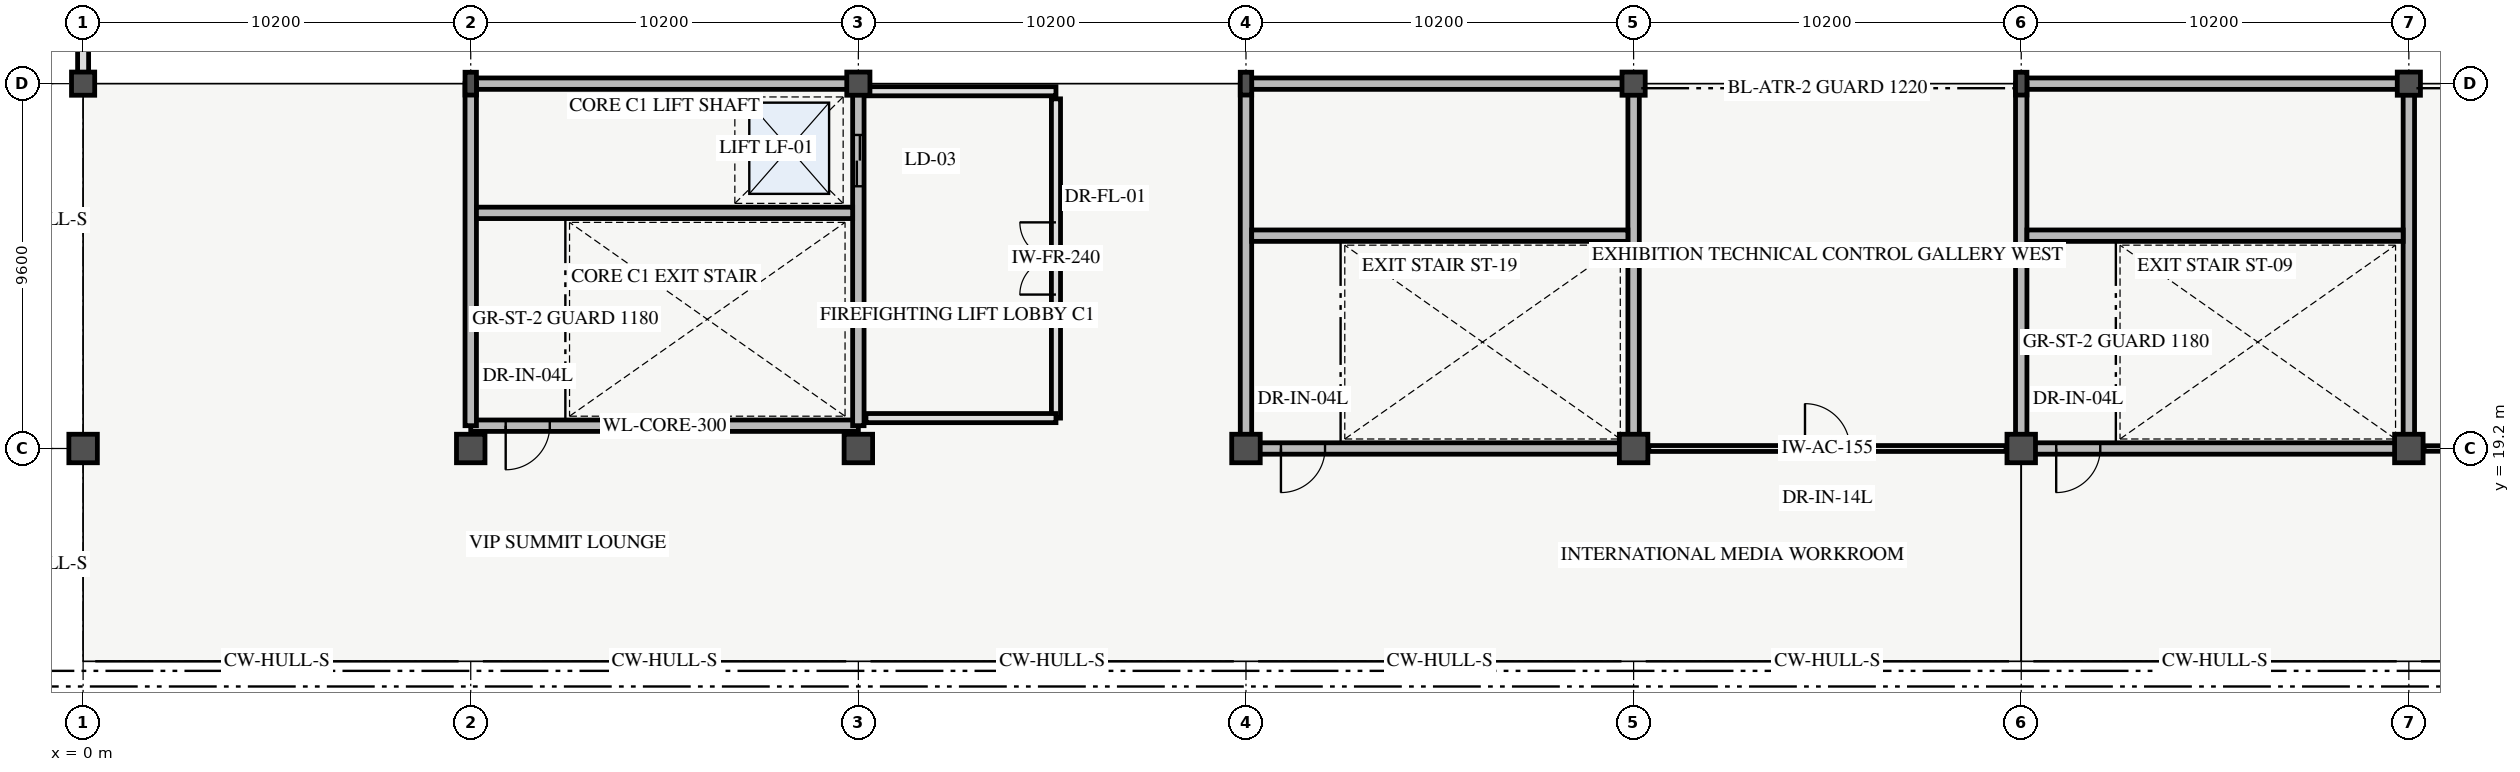
"""IFC4 building model, lengths in metres.
Left out: names, types, materials, properties, quantities, classifications, styles, units other than length and angle.
Written with IfcOpenShell. Run it as: python <this file> out.ifc"""

import sys

from ifc_helpers import new_model, si_unit, direction, frame, frame_2d, origin, origin_2d, place, context, subcontext, project, spatial, rectangle, hollow_circle, i_section, extrude, element, fill, save


model = new_model("IFC4")
c1 = context("Model", 3, precision=1e-05, world=origin(), true_north=direction((0.0, 1.0)))
c2 = subcontext(c1, "Body", "Model", "MODEL_VIEW")
j1 = project(units=[si_unit("LENGTHUNIT", "METRE"), si_unit("PLANEANGLEUNIT", "RADIAN")], contexts=[c1])
p1 = place(None, origin())
s1 = spatial("IfcSite", under=j1, at=p1, CompositionType="ELEMENT")
p2 = place(p1, origin())
s2 = spatial("IfcBuilding", under=s1, at=p2, CompositionType="ELEMENT")
p3 = place(p2, frame((0.0, 0.0, 10.8)))
s3 = spatial("IfcBuildingStorey", under=s2, at=p3, CompositionType="ELEMENT", Elevation=10.8)
p4 = place(p3, frame((0.0, 19.2, 0.0), z_axis=(0.0, 0.0, 1.0), x_axis=(1.0, 0.0, 0.0)))
e1 = element("IfcColumn", 1, at=p4, inside=s3, PredefinedType="COLUMN", context=c2, shape_type="SweptSolid", body=[
    extrude(rectangle(XDim=0.75, YDim=0.75, at=origin_2d()), origin(), (0.0, 0.0, 1.0), 4.2),
])
p5 = place(p3, frame((0.0, 28.8, 0.0), z_axis=(0.0, 0.0, 1.0), x_axis=(1.0, 0.0, 0.0)))
e2 = element("IfcColumn", 2, at=p5, inside=s3, PredefinedType="COLUMN", context=c2, shape_type="SweptSolid", body=[
    extrude(hollow_circle(Radius=0.305, WallThickness=0.025, at=origin_2d()), origin(), (0.0, 0.0, 1.0), 4.2),
])
p6 = place(p3, frame((10.2, 19.2, 0.0), z_axis=(0.0, 0.0, 1.0), x_axis=(1.0, 0.0, 0.0)))
e3 = element("IfcColumn", 3, at=p6, inside=s3, PredefinedType="COLUMN", context=c2, shape_type="SweptSolid", body=[
    extrude(rectangle(XDim=0.75, YDim=0.75, at=origin_2d()), origin(), (0.0, 0.0, 1.0), 4.2),
])
p7 = place(p3, frame((10.2, 28.8, 0.0), z_axis=(0.0, 0.0, 1.0), x_axis=(1.0, 0.0, 0.0)))
e4 = element("IfcColumn", 4, at=p7, inside=s3, PredefinedType="COLUMN", context=c2, shape_type="SweptSolid", body=[
    extrude(i_section(OverallWidth=0.3, OverallDepth=0.6, WebThickness=0.015, FlangeThickness=0.03, FilletRadius=0.027, at=origin_2d()), origin(), (0.0, 0.0, 1.0), 4.2),
])
p8 = place(p3, frame((20.4, 19.2, 0.0), z_axis=(0.0, 0.0, 1.0), x_axis=(1.0, 0.0, 0.0)))
e5 = element("IfcColumn", 5, at=p8, inside=s3, PredefinedType="COLUMN", context=c2, shape_type="SweptSolid", body=[
    extrude(rectangle(XDim=0.75, YDim=0.75, at=origin_2d()), origin(), (0.0, 0.0, 1.0), 4.2),
])
p9 = place(p3, frame((20.4, 28.8, 0.0), z_axis=(0.0, 0.0, 1.0), x_axis=(1.0, 0.0, 0.0)))
e6 = element("IfcColumn", 6, at=p9, inside=s3, PredefinedType="COLUMN", context=c2, shape_type="SweptSolid", body=[
    extrude(hollow_circle(Radius=0.305, WallThickness=0.025, at=origin_2d()), origin(), (0.0, 0.0, 1.0), 4.2),
])
p10 = place(p3, frame((30.6, 19.2, 0.0), z_axis=(0.0, 0.0, 1.0), x_axis=(1.0, 0.0, 0.0)))
e7 = element("IfcColumn", 7, at=p10, inside=s3, PredefinedType="COLUMN", context=c2, shape_type="SweptSolid", body=[
    extrude(rectangle(XDim=0.75, YDim=0.75, at=origin_2d()), origin(), (0.0, 0.0, 1.0), 4.2),
])
p11 = place(p3, frame((30.6, 28.8, 0.0), z_axis=(0.0, 0.0, 1.0), x_axis=(1.0, 0.0, 0.0)))
e8 = element("IfcColumn", 8, at=p11, inside=s3, PredefinedType="COLUMN", context=c2, shape_type="SweptSolid", body=[
    extrude(i_section(OverallWidth=0.3, OverallDepth=0.6, WebThickness=0.015, FlangeThickness=0.03, FilletRadius=0.027, at=origin_2d()), origin(), (0.0, 0.0, 1.0), 4.2),
])
p12 = place(p3, frame((40.8, 19.2, 0.0), z_axis=(0.0, 0.0, 1.0), x_axis=(1.0, 0.0, 0.0)))
e9 = element("IfcColumn", 9, at=p12, inside=s3, PredefinedType="COLUMN", context=c2, shape_type="SweptSolid", body=[
    extrude(rectangle(XDim=0.75, YDim=0.75, at=origin_2d()), origin(), (0.0, 0.0, 1.0), 4.2),
])
p13 = place(p3, frame((40.8, 28.8, 0.0), z_axis=(0.0, 0.0, 1.0), x_axis=(1.0, 0.0, 0.0)))
e10 = element("IfcColumn", 10, at=p13, inside=s3, PredefinedType="COLUMN", context=c2, shape_type="SweptSolid", body=[
    extrude(hollow_circle(Radius=0.305, WallThickness=0.025, at=origin_2d()), origin(), (0.0, 0.0, 1.0), 4.2),
])
p14 = place(p3, frame((51.0, 19.2, 0.0), z_axis=(0.0, 0.0, 1.0), x_axis=(1.0, 0.0, 0.0)))
e11 = element("IfcColumn", 11, at=p14, inside=s3, PredefinedType="COLUMN", context=c2, shape_type="SweptSolid", body=[
    extrude(rectangle(XDim=0.75, YDim=0.75, at=origin_2d()), origin(), (0.0, 0.0, 1.0), 4.2),
])
p15 = place(p3, frame((51.0, 28.8, 0.0), z_axis=(0.0, 0.0, 1.0), x_axis=(1.0, 0.0, 0.0)))
e12 = element("IfcColumn", 12, at=p15, inside=s3, PredefinedType="COLUMN", context=c2, shape_type="SweptSolid", body=[
    extrude(i_section(OverallWidth=0.3, OverallDepth=0.6, WebThickness=0.015, FlangeThickness=0.03, FilletRadius=0.027, at=origin_2d()), origin(), (0.0, 0.0, 1.0), 4.2),
])
p16 = place(p3, frame((61.2, 19.2, 0.0), z_axis=(0.0, 0.0, 1.0), x_axis=(1.0, 0.0, 0.0)))
e13 = element("IfcColumn", 13, at=p16, inside=s3, PredefinedType="COLUMN", context=c2, shape_type="SweptSolid", body=[
    extrude(rectangle(XDim=0.75, YDim=0.75, at=origin_2d()), origin(), (0.0, 0.0, 1.0), 4.2),
])
p17 = place(p3, frame((61.2, 28.8, 0.0), z_axis=(0.0, 0.0, 1.0), x_axis=(1.0, 0.0, 0.0)))
e14 = element("IfcColumn", 14, at=p17, inside=s3, PredefinedType="COLUMN", context=c2, shape_type="SweptSolid", body=[
    extrude(hollow_circle(Radius=0.305, WallThickness=0.025, at=origin_2d()), origin(), (0.0, 0.0, 1.0), 4.2),
])
p18 = place(p3, frame((10.2, 19.8, 0.0), z_axis=(0.0, 0.0, 1.0), x_axis=(1.0, 0.0, 0.0)))
e15 = element("IfcWall", 15, at=p18, inside=s3, PredefinedType="SHEAR", context=c2, shape_type="SweptSolid", body=[
    extrude(rectangle(XDim=10.2, YDim=0.3, at=frame_2d((5.1, 0.0))), origin(), (0.0, 0.0, 1.0), 4.2),
])
p19 = place(p18, frame((0.92, 0.0, 0.0)))
e16 = element("IfcOpeningElement", 16, at=p19, cuts=e15, PredefinedType="OPENING", context=c2, shape_type="SweptSolid", body=[
    extrude(rectangle(XDim=1.16, YDim=2.2, at=frame_2d((0.58, 1.1))), frame((0.0, 0.16, 0.0), z_axis=(0.0, -1.0, 0.0), x_axis=(1.0, 0.0, 0.0)), (0.0, 0.0, 1.0), 0.32),
])
p20 = place(p3, frame((10.2, 28.8, 0.0), z_axis=(0.0, 0.0, 1.0), x_axis=(1.0, 0.0, 0.0)))
e17 = element("IfcWall", 17, at=p20, inside=s3, PredefinedType="SHEAR", context=c2, shape_type="SweptSolid", body=[
    extrude(rectangle(XDim=10.2, YDim=0.3, at=frame_2d((5.1, 0.0))), origin(), (0.0, 0.0, 1.0), 4.2),
])
p21 = place(p3, frame((10.2, 19.8, 0.0), z_axis=(0.0, 0.0, 1.0), x_axis=(0.0, 1.0, 0.0)))
e18 = element("IfcWall", 18, at=p21, inside=s3, PredefinedType="SHEAR", context=c2, shape_type="SweptSolid", body=[
    extrude(rectangle(XDim=9.0, YDim=0.3, at=frame_2d((4.5, 0.0))), origin(), (0.0, 0.0, 1.0), 4.2),
])
p22 = place(p3, frame((20.4, 19.8, 0.0), z_axis=(0.0, 0.0, 1.0), x_axis=(0.0, 1.0, 0.0)))
e19 = element("IfcWall", 19, at=p22, inside=s3, PredefinedType="SHEAR", context=c2, shape_type="SweptSolid", body=[
    extrude(rectangle(XDim=9.0, YDim=0.3, at=frame_2d((4.5, 0.0))), origin(), (0.0, 0.0, 1.0), 4.2),
])
p23 = place(p22, frame((6.3, 0.0, 0.0)))
e20 = element("IfcOpeningElement", 20, at=p23, cuts=e19, PredefinedType="OPENING", context=c2, shape_type="SweptSolid", body=[
    extrude(rectangle(XDim=1.35, YDim=2.3, at=frame_2d((0.675, 1.15))), frame((0.0, 0.16, 0.0), z_axis=(0.0, -1.0, 0.0), x_axis=(1.0, 0.0, 0.0)), (0.0, 0.0, 1.0), 0.32),
])
p24 = place(p3, frame((0.0, 29.04, 0.0), z_axis=(0.0, 0.0, 1.0), x_axis=(0.0, 1.0, 0.0)))
e21 = element("IfcWall", 21, at=p24, inside=s3, PredefinedType="SOLIDWALL", context=c2, shape_type="SweptSolid", body=[
    extrude(rectangle(XDim=11.32, YDim=0.29, at=frame_2d((5.66, 0.0))), origin(), (0.0, 0.0, 1.0), 3.06),
])
p25 = place(p3, frame((10.35, 25.4, 0.0), z_axis=(0.0, 0.0, 1.0), x_axis=(1.0, 0.0, 0.0)))
e22 = element("IfcWall", 22, at=p25, inside=s3, PredefinedType="SHEAR", context=c2, shape_type="SweptSolid", body=[
    extrude(rectangle(XDim=9.9, YDim=0.3, at=frame_2d((4.95, 0.0))), origin(), (0.0, 0.0, 1.0), 4.2),
])
p26 = place(p3, frame((51.0, 19.2, 0.0), z_axis=(0.0, 0.0, 1.0), x_axis=(1.0, 0.0, 0.0)))
e23 = element("IfcWall", 23, at=p26, inside=s3, PredefinedType="SHEAR", context=c2, shape_type="SweptSolid", body=[
    extrude(rectangle(XDim=10.2, YDim=0.3, at=frame_2d((5.1, 0.0))), origin(), (0.0, 0.0, 1.0), 4.2),
])
p27 = place(p26, frame((0.92, 0.0, 0.0)))
e24 = element("IfcOpeningElement", 24, at=p27, cuts=e23, PredefinedType="OPENING", context=c2, shape_type="SweptSolid", body=[
    extrude(rectangle(XDim=1.16, YDim=2.2, at=frame_2d((0.58, 1.1))), frame((0.0, 0.16, 0.0), z_axis=(0.0, -1.0, 0.0), x_axis=(1.0, 0.0, 0.0)), (0.0, 0.0, 1.0), 0.32),
])
p28 = place(p3, frame((51.0, 28.8, 0.0), z_axis=(0.0, 0.0, 1.0), x_axis=(1.0, 0.0, 0.0)))
e25 = element("IfcWall", 25, at=p28, inside=s3, PredefinedType="SHEAR", context=c2, shape_type="SweptSolid", body=[
    extrude(rectangle(XDim=10.2, YDim=0.3, at=frame_2d((5.1, 0.0))), origin(), (0.0, 0.0, 1.0), 4.2),
])
for number, where, z_axis, x_axis in (
    (26, (51.0, 19.2, 0.0), (0.0, 0.0, 1.0), (0.0, 1.0, 0.0)),
    (27, (61.2, 19.2, 0.0), (0.0, 0.0, 1.0), (0.0, 1.0, 0.0)),
):
    element("IfcWall", number, at=place(p3, frame(where, z_axis=z_axis, x_axis=x_axis)), inside=s3, PredefinedType="SHEAR", context=c2, shape_type="SweptSolid", body=[
        extrude(rectangle(XDim=9.6, YDim=0.3, at=frame_2d((4.8, 0.0))), origin(), (0.0, 0.0, 1.0), 4.2),
    ])
p29 = place(p3, frame((51.15, 24.8, 0.0), z_axis=(0.0, 0.0, 1.0), x_axis=(1.0, 0.0, 0.0)))
e28 = element("IfcWall", 28, at=p29, inside=s3, PredefinedType="SHEAR", context=c2, shape_type="SweptSolid", body=[
    extrude(rectangle(XDim=9.9, YDim=0.3, at=frame_2d((4.95, 0.0))), origin(), (0.0, 0.0, 1.0), 4.2),
])
p30 = place(p3, frame((30.6, 19.2, 0.0), z_axis=(0.0, 0.0, 1.0), x_axis=(1.0, 0.0, 0.0)))
e29 = element("IfcWall", 29, at=p30, inside=s3, PredefinedType="SHEAR", context=c2, shape_type="SweptSolid", body=[
    extrude(rectangle(XDim=10.2, YDim=0.3, at=frame_2d((5.1, 0.0))), origin(), (0.0, 0.0, 1.0), 4.2),
])
p31 = place(p30, frame((0.92, 0.0, 0.0)))
e30 = element("IfcOpeningElement", 30, at=p31, cuts=e29, PredefinedType="OPENING", context=c2, shape_type="SweptSolid", body=[
    extrude(rectangle(XDim=1.16, YDim=2.2, at=frame_2d((0.58, 1.1))), frame((0.0, 0.16, 0.0), z_axis=(0.0, -1.0, 0.0), x_axis=(1.0, 0.0, 0.0)), (0.0, 0.0, 1.0), 0.32),
])
p32 = place(p3, frame((30.6, 28.8, 0.0), z_axis=(0.0, 0.0, 1.0), x_axis=(1.0, 0.0, 0.0)))
e31 = element("IfcWall", 31, at=p32, inside=s3, PredefinedType="SHEAR", context=c2, shape_type="SweptSolid", body=[
    extrude(rectangle(XDim=10.2, YDim=0.3, at=frame_2d((5.1, 0.0))), origin(), (0.0, 0.0, 1.0), 4.2),
])
for number, where, z_axis, x_axis in (
    (32, (30.6, 19.2, 0.0), (0.0, 0.0, 1.0), (0.0, 1.0, 0.0)),
    (33, (40.8, 19.2, 0.0), (0.0, 0.0, 1.0), (0.0, 1.0, 0.0)),
):
    element("IfcWall", number, at=place(p3, frame(where, z_axis=z_axis, x_axis=x_axis)), inside=s3, PredefinedType="SHEAR", context=c2, shape_type="SweptSolid", body=[
        extrude(rectangle(XDim=9.6, YDim=0.3, at=frame_2d((4.8, 0.0))), origin(), (0.0, 0.0, 1.0), 4.2),
    ])
p33 = place(p3, frame((30.75, 24.8, 0.0), z_axis=(0.0, 0.0, 1.0), x_axis=(1.0, 0.0, 0.0)))
e34 = element("IfcWall", 34, at=p33, inside=s3, PredefinedType="SHEAR", context=c2, shape_type="SweptSolid", body=[
    extrude(rectangle(XDim=9.9, YDim=0.3, at=frame_2d((4.95, 0.0))), origin(), (0.0, 0.0, 1.0), 4.2),
])
p34 = place(p3, frame((25.6, 20.0, 0.0), z_axis=(0.0, 0.0, 1.0), x_axis=(0.0, 1.0, 0.0)))
e35 = element("IfcWall", 35, at=p34, inside=s3, PredefinedType="PARTITIONING", context=c2, shape_type="SweptSolid", body=[
    extrude(rectangle(XDim=8.4, YDim=0.24, at=frame_2d((4.2, 0.0))), origin(), (0.0, 0.0, 1.0), 3.06),
])
p35 = place(p34, frame((3.25, 0.0, 0.0)))
e36 = element("IfcOpeningElement", 36, at=p35, cuts=e35, PredefinedType="OPENING", context=c2, shape_type="SweptSolid", body=[
    extrude(rectangle(XDim=1.9, YDim=2.25, at=frame_2d((0.95, 1.125))), frame((0.0, 0.13, 0.0), z_axis=(0.0, -1.0, 0.0), x_axis=(1.0, 0.0, 0.0)), (0.0, 0.0, 1.0), 0.26),
])
for number, where, z_axis, x_axis in (
    (37, (20.6, 28.6, 0.0), (0.0, 0.0, 1.0), (1.0, 0.0, 0.0)),
    (38, (20.6, 20.0, 0.0), (0.0, 0.0, 1.0), (1.0, 0.0, 0.0)),
):
    element("IfcWall", number, at=place(p3, frame(where, z_axis=z_axis, x_axis=x_axis)), inside=s3, PredefinedType="PARTITIONING", context=c2, shape_type="SweptSolid", body=[
        extrude(rectangle(XDim=5.0, YDim=0.24, at=frame_2d((2.5, 0.0))), origin(), (0.0, 0.0, 1.0), 3.06),
    ])
p36 = place(p3, frame((41.2, 19.2, 0.0), z_axis=(0.0, 0.0, 1.0), x_axis=(1.0, 0.0, 0.0)))
e39 = element("IfcWall", 39, at=p36, inside=s3, PredefinedType="PARTITIONING", context=c2, shape_type="SweptSolid", body=[
    extrude(rectangle(XDim=9.4, YDim=0.155, at=frame_2d((4.7, 0.0))), origin(), (0.0, 0.0, 1.0), 3.06),
])
p37 = place(p36, frame((4.11, 0.0, 0.0)))
e40 = element("IfcOpeningElement", 40, at=p37, cuts=e39, PredefinedType="OPENING", context=c2, shape_type="SweptSolid", body=[
    extrude(rectangle(XDim=1.18, YDim=2.22, at=frame_2d((0.59, 1.11))), frame((0.0, 0.087, 0.0), z_axis=(0.0, -1.0, 0.0), x_axis=(1.0, 0.0, 0.0)), (0.0, 0.0, 1.0), 0.175),
])
p38 = place(p3, frame((61.6, 19.2, 0.0), z_axis=(0.0, 0.0, 1.0), x_axis=(1.0, 0.0, 0.0)))
e41 = element("IfcWall", 41, at=p38, inside=s3, PredefinedType="PARTITIONING", context=c2, shape_type="SweptSolid", body=[
    extrude(rectangle(XDim=9.4, YDim=0.145, at=frame_2d((4.7, 0.0))), origin(), (0.0, 0.0, 1.0), 3.06),
])
p39 = place(p38, frame((4.09, 0.0, 0.0)))
e42 = element("IfcOpeningElement", 42, at=p39, cuts=e41, PredefinedType="OPENING", context=c2, shape_type="SweptSolid", body=[
    extrude(rectangle(XDim=1.22, YDim=2.22, at=frame_2d((0.61, 1.11))), frame((0.0, 0.083, 0.0), z_axis=(0.0, -1.0, 0.0), x_axis=(1.0, 0.0, 0.0)), (0.0, 0.0, 1.0), 0.165),
])
p40 = place(p19, origin())
e43 = element("IfcDoor", 43, at=p40, inside=s3, OperationType="SINGLE_SWING_LEFT", PredefinedType="DOOR", context=c2, shape_type="SweptSolid", body=[
    extrude(rectangle(XDim=1.16, YDim=2.2, at=frame_2d((0.58, 1.1))), frame((0.0, 0.025, 0.0), z_axis=(0.0, -1.0, 0.0), x_axis=(1.0, 0.0, 0.0)), (0.0, 0.0, 1.0), 0.05),
])
fill(e16, e43)
p41 = place(p23, origin())
e44 = element("IfcDoor", 44, at=p41, inside=s3, OperationType="DOUBLE_DOOR_SLIDING", PredefinedType="DOOR", context=c2, shape_type="SweptSolid", body=[
    extrude(rectangle(XDim=1.35, YDim=2.3, at=frame_2d((0.675, 1.15))), frame((0.0, 0.025, 0.0), z_axis=(0.0, -1.0, 0.0), x_axis=(1.0, 0.0, 0.0)), (0.0, 0.0, 1.0), 0.05),
])
fill(e20, e44)
p42 = place(p27, origin())
e45 = element("IfcDoor", 45, at=p42, inside=s3, OperationType="SINGLE_SWING_LEFT", PredefinedType="DOOR", context=c2, shape_type="SweptSolid", body=[
    extrude(rectangle(XDim=1.16, YDim=2.2, at=frame_2d((0.58, 1.1))), frame((0.0, 0.025, 0.0), z_axis=(0.0, -1.0, 0.0), x_axis=(1.0, 0.0, 0.0)), (0.0, 0.0, 1.0), 0.05),
])
fill(e24, e45)
p43 = place(p31, origin())
e46 = element("IfcDoor", 46, at=p43, inside=s3, OperationType="SINGLE_SWING_LEFT", PredefinedType="DOOR", context=c2, shape_type="SweptSolid", body=[
    extrude(rectangle(XDim=1.16, YDim=2.2, at=frame_2d((0.58, 1.1))), frame((0.0, 0.025, 0.0), z_axis=(0.0, -1.0, 0.0), x_axis=(1.0, 0.0, 0.0)), (0.0, 0.0, 1.0), 0.05),
])
fill(e30, e46)
p44 = place(p35, origin())
e47 = element("IfcDoor", 47, at=p44, inside=s3, OperationType="DOUBLE_DOOR_SINGLE_SWING", PredefinedType="DOOR", context=c2, shape_type="SweptSolid", body=[
    extrude(rectangle(XDim=1.9, YDim=2.25, at=frame_2d((0.95, 1.125))), frame((0.0, 0.025, 0.0), z_axis=(0.0, -1.0, 0.0), x_axis=(1.0, 0.0, 0.0)), (0.0, 0.0, 1.0), 0.05),
])
fill(e36, e47)
p45 = place(p37, origin())
e48 = element("IfcDoor", 48, at=p45, inside=s3, OperationType="SINGLE_SWING_LEFT", PredefinedType="DOOR", context=c2, shape_type="SweptSolid", body=[
    extrude(rectangle(XDim=1.18, YDim=2.22, at=frame_2d((0.59, 1.11))), frame((0.0, 0.025, 0.0), z_axis=(0.0, -1.0, 0.0), x_axis=(1.0, 0.0, 0.0)), (0.0, 0.0, 1.0), 0.05),
])
fill(e40, e48)
save(model, sys.argv[1])
